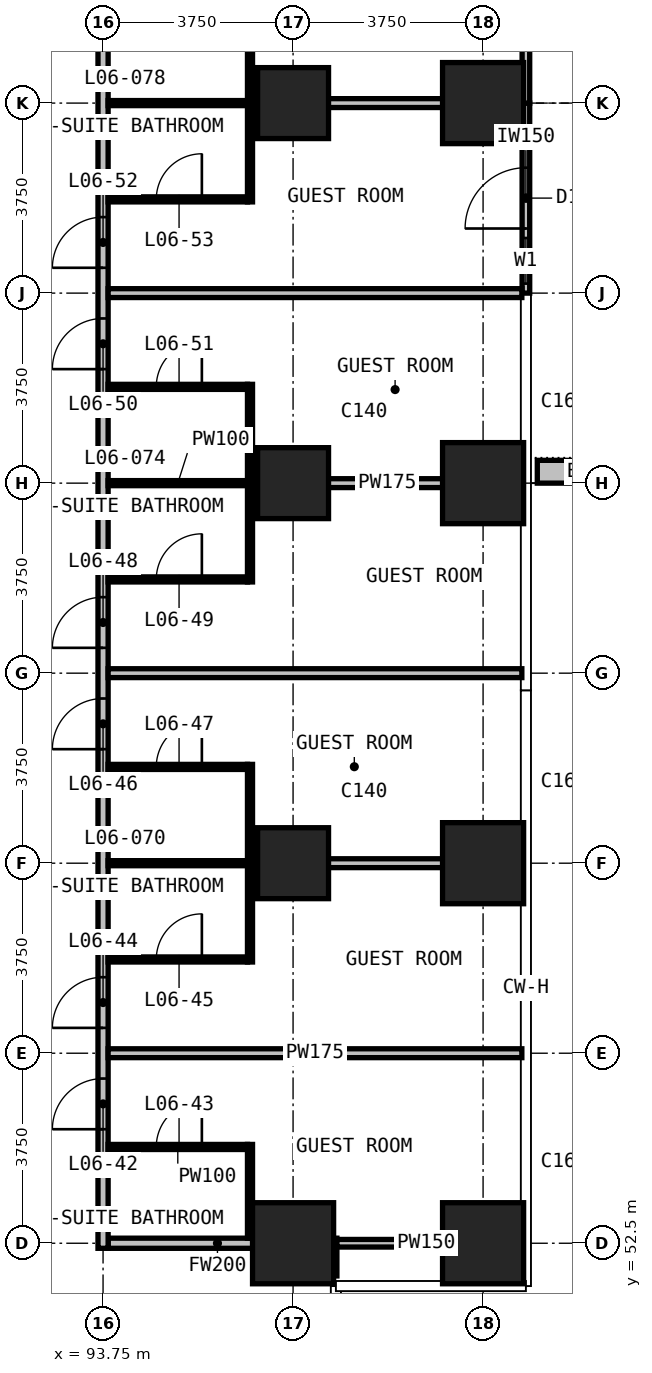
"""IFC4 building model, lengths in metres.
Left out: names, types, materials, properties, quantities, classifications, styles, units other than length and angle.
Written with IfcOpenShell. Run it as: python <this file> out.ifc"""

import sys

from ifc_helpers import new_model, si_unit, direction, frame, frame_2d, origin, origin_2d, place, context, subcontext, project, spatial, rectangle, extrude, element, fill, save


model = new_model("IFC4")
c1 = context("Model", 3, precision=1e-05, world=origin(), true_north=direction((0.0, 1.0)))
c2 = subcontext(c1, "Body", "Model", "MODEL_VIEW")
j1 = project(units=[si_unit("LENGTHUNIT", "METRE"), si_unit("PLANEANGLEUNIT", "RADIAN")], contexts=[c1])
p1 = place(None, origin())
s1 = spatial("IfcSite", under=j1, at=p1, CompositionType="ELEMENT")
p2 = place(p1, origin())
s2 = spatial("IfcBuilding", under=s1, at=p2, CompositionType="ELEMENT")
p3 = place(p2, frame((0.0, 0.0, 39.5)))
s3 = spatial("IfcBuildingStorey", under=s2, at=p3, CompositionType="ELEMENT", Elevation=39.5)
p4 = place(p3, frame((97.5, 52.5, 0.0), z_axis=(0.0, 0.0, 1.0), x_axis=(1.0, 0.0, 0.0)))
e1 = element("IfcColumn", 1, at=p4, inside=s3, PredefinedType="COLUMN", context=c2, shape_type="SweptSolid", body=[
    extrude(rectangle(XDim=1.6, YDim=1.6, at=origin_2d()), origin(), (0.0, 0.0, 1.0), 3.3),
])
for number, where, z_axis, x_axis in (
    (2, (97.5, 60.0, 0.0), (0.0, 0.0, 1.0), (1.0, 0.0, 0.0)),
    (3, (97.5, 67.5, 0.0), (0.0, 0.0, 1.0), (1.0, 0.0, 0.0)),
    (4, (97.5, 75.0, 0.0), (0.0, 0.0, 1.0), (1.0, 0.0, 0.0)),
):
    element("IfcColumn", number, at=place(p3, frame(where, z_axis=z_axis, x_axis=x_axis)), inside=s3, PredefinedType="COLUMN", context=c2, shape_type="SweptSolid", body=[
        extrude(rectangle(XDim=1.4, YDim=1.4, at=origin_2d()), origin(), (0.0, 0.0, 1.0), 3.3),
    ])
for number, where, z_axis, x_axis in (
    (5, (101.25, 52.5, 0.0), (0.0, 0.0, 1.0), (1.0, 0.0, 0.0)),
    (6, (101.25, 60.0, 0.0), (0.0, 0.0, 1.0), (1.0, 0.0, 0.0)),
    (7, (101.25, 67.5, 0.0), (0.0, 0.0, 1.0), (1.0, 0.0, 0.0)),
    (8, (101.25, 75.0, 0.0), (0.0, 0.0, 1.0), (1.0, 0.0, 0.0)),
):
    element("IfcColumn", number, at=place(p3, frame(where, z_axis=z_axis, x_axis=x_axis)), inside=s3, PredefinedType="COLUMN", context=c2, shape_type="SweptSolid", body=[
        extrude(rectangle(XDim=1.6, YDim=1.6, at=origin_2d()), origin(), (0.0, 0.0, 1.0), 3.3),
    ])
p5 = place(p3, frame((102.095, 71.25, 0.0), z_axis=(0.0, 0.0, 1.0), x_axis=(0.0, 1.0, 0.0)))
e9 = element("IfcWall", 9, at=p5, inside=s3, PredefinedType="SOLIDWALL", context=c2, shape_type="SweptSolid", body=[
    extrude(rectangle(XDim=3.75, YDim=0.15, at=frame_2d((1.875, 0.0))), origin(), (0.0, 0.0, 1.0), 3.0),
])
p6 = place(p5, frame((0.188, 0.0, 0.1)))
e10 = element("IfcOpeningElement", 10, at=p6, cuts=e9, PredefinedType="OPENING", context=c2, shape_type="SweptSolid", body=[
    extrude(rectangle(XDim=0.9, YDim=2.4, at=frame_2d((0.45, 1.2))), frame((0.0, 0.085, 0.0), z_axis=(0.0, -1.0, 0.0), x_axis=(1.0, 0.0, 0.0)), (0.0, 0.0, 1.0), 0.17),
])
p7 = place(p5, frame((1.275, 0.0, 0.0)))
e11 = element("IfcOpeningElement", 11, at=p7, cuts=e9, PredefinedType="OPENING", context=c2, shape_type="SweptSolid", body=[
    extrude(rectangle(XDim=1.2, YDim=2.4, at=frame_2d((0.6, 1.2))), frame((0.0, 0.085, 0.0), z_axis=(0.0, -1.0, 0.0), x_axis=(1.0, 0.0, 0.0)), (0.0, 0.0, 1.0), 0.17),
])
p8 = place(p3, frame((102.095, 75.0, 0.0), z_axis=(0.0, 0.0, 1.0), x_axis=(0.0, 1.0, 0.0)))
e12 = element("IfcWall", 12, at=p8, inside=s3, PredefinedType="SOLIDWALL", context=c2, shape_type="SweptSolid", body=[
    extrude(rectangle(XDim=3.75, YDim=0.15, at=frame_2d((1.875, 0.0))), origin(), (0.0, 0.0, 1.0), 3.0),
])
p9 = place(p8, frame((1.275, 0.0, 0.0)))
e13 = element("IfcOpeningElement", 13, at=p9, cuts=e12, PredefinedType="OPENING", context=c2, shape_type="SweptSolid", body=[
    extrude(rectangle(XDim=1.2, YDim=2.4, at=frame_2d((0.6, 1.2))), frame((0.0, 0.085, 0.0), z_axis=(0.0, -1.0, 0.0), x_axis=(1.0, 0.0, 0.0)), (0.0, 0.0, 1.0), 0.17),
])
p10 = place(p8, frame((2.663, 0.0, 0.1)))
e14 = element("IfcOpeningElement", 14, at=p10, cuts=e12, PredefinedType="OPENING", context=c2, shape_type="SweptSolid", body=[
    extrude(rectangle(XDim=0.9, YDim=2.4, at=frame_2d((0.45, 1.2))), frame((0.0, 0.085, 0.0), z_axis=(0.0, -1.0, 0.0), x_axis=(1.0, 0.0, 0.0)), (0.0, 0.0, 1.0), 0.17),
])
p11 = place(p3, frame((102.32, 67.725, 0.0), z_axis=(0.0, 0.0, 1.0), x_axis=(1.0, 0.0, 0.0)))
e15 = element("IfcWall", 15, at=p11, inside=s3, PredefinedType="USERDEFINED", context=c2, shape_type="SweptSolid", body=[
    extrude(rectangle(XDim=2.33, YDim=0.45, at=frame_2d((1.165, 0.0))), origin(), (0.0, 0.0, 1.0), 1.1),
])
p12 = place(p3, frame((93.85, 52.5, 0.0), z_axis=(0.0, 0.0, 1.0), x_axis=(1.0, 0.0, 0.0)))
e16 = element("IfcWall", 16, at=p12, inside=s3, PredefinedType="PARTITIONING", context=c2, shape_type="SweptSolid", body=[
    extrude(rectangle(XDim=4.315, YDim=0.2, at=frame_2d((2.157, 0.0))), origin(), (0.0, 0.0, 1.0), 3.0),
])
p13 = place(p3, frame((93.75, 52.4, 0.0), z_axis=(0.0, 0.0, 1.0), x_axis=(0.0, 1.0, 0.0)))
e17 = element("IfcWall", 17, at=p13, inside=s3, PredefinedType="PARTITIONING", context=c2, shape_type="SweptSolid", body=[
    extrude(rectangle(XDim=33.925, YDim=0.2, at=frame_2d((16.962, 0.0))), origin(), (0.0, 0.0, 1.0), 3.0),
])
p14 = place(p13, frame((2.35, 0.0, 0.0)))
e18 = element("IfcOpeningElement", 18, at=p14, cuts=e17, PredefinedType="OPENING", context=c2, shape_type="SweptSolid", body=[
    extrude(rectangle(XDim=1.0, YDim=2.2, at=frame_2d((0.5, 1.1))), frame((0.0, 0.11, 0.0), z_axis=(0.0, -1.0, 0.0), x_axis=(1.0, 0.0, 0.0)), (0.0, 0.0, 1.0), 0.22),
])
p15 = place(p13, frame((4.35, 0.0, 0.0)))
e19 = element("IfcOpeningElement", 19, at=p15, cuts=e17, PredefinedType="OPENING", context=c2, shape_type="SweptSolid", body=[
    extrude(rectangle(XDim=1.0, YDim=2.2, at=frame_2d((0.5, 1.1))), frame((0.0, 0.11, 0.0), z_axis=(0.0, -1.0, 0.0), x_axis=(1.0, 0.0, 0.0)), (0.0, 0.0, 1.0), 0.22),
])
p16 = place(p13, frame((9.85, 0.0, 0.0)))
e20 = element("IfcOpeningElement", 20, at=p16, cuts=e17, PredefinedType="OPENING", context=c2, shape_type="SweptSolid", body=[
    extrude(rectangle(XDim=1.0, YDim=2.2, at=frame_2d((0.5, 1.1))), frame((0.0, 0.11, 0.0), z_axis=(0.0, -1.0, 0.0), x_axis=(1.0, 0.0, 0.0)), (0.0, 0.0, 1.0), 0.22),
])
p17 = place(p13, frame((11.85, 0.0, 0.0)))
e21 = element("IfcOpeningElement", 21, at=p17, cuts=e17, PredefinedType="OPENING", context=c2, shape_type="SweptSolid", body=[
    extrude(rectangle(XDim=1.0, YDim=2.2, at=frame_2d((0.5, 1.1))), frame((0.0, 0.11, 0.0), z_axis=(0.0, -1.0, 0.0), x_axis=(1.0, 0.0, 0.0)), (0.0, 0.0, 1.0), 0.22),
])
p18 = place(p13, frame((17.35, 0.0, 0.0)))
e22 = element("IfcOpeningElement", 22, at=p18, cuts=e17, PredefinedType="OPENING", context=c2, shape_type="SweptSolid", body=[
    extrude(rectangle(XDim=1.0, YDim=2.2, at=frame_2d((0.5, 1.1))), frame((0.0, 0.11, 0.0), z_axis=(0.0, -1.0, 0.0), x_axis=(1.0, 0.0, 0.0)), (0.0, 0.0, 1.0), 0.22),
])
p19 = place(p13, frame((19.35, 0.0, 0.0)))
e23 = element("IfcOpeningElement", 23, at=p19, cuts=e17, PredefinedType="OPENING", context=c2, shape_type="SweptSolid", body=[
    extrude(rectangle(XDim=1.0, YDim=2.2, at=frame_2d((0.5, 1.1))), frame((0.0, 0.11, 0.0), z_axis=(0.0, -1.0, 0.0), x_axis=(1.0, 0.0, 0.0)), (0.0, 0.0, 1.0), 0.22),
])
p20 = place(p13, frame((24.85, 0.0, 0.0)))
e24 = element("IfcOpeningElement", 24, at=p20, cuts=e17, PredefinedType="OPENING", context=c2, shape_type="SweptSolid", body=[
    extrude(rectangle(XDim=1.0, YDim=2.2, at=frame_2d((0.5, 1.1))), frame((0.0, 0.11, 0.0), z_axis=(0.0, -1.0, 0.0), x_axis=(1.0, 0.0, 0.0)), (0.0, 0.0, 1.0), 0.22),
])
p21 = place(p13, frame((26.85, 0.0, 0.0)))
e25 = element("IfcOpeningElement", 25, at=p21, cuts=e17, PredefinedType="OPENING", context=c2, shape_type="SweptSolid", body=[
    extrude(rectangle(XDim=1.0, YDim=2.2, at=frame_2d((0.5, 1.1))), frame((0.0, 0.11, 0.0), z_axis=(0.0, -1.0, 0.0), x_axis=(1.0, 0.0, 0.0)), (0.0, 0.0, 1.0), 0.22),
])
p22 = place(p13, frame((31.55, 0.0, 0.0)))
e26 = element("IfcOpeningElement", 26, at=p22, cuts=e17, PredefinedType="OPENING", context=c2, shape_type="SweptSolid", body=[
    extrude(rectangle(XDim=0.9, YDim=2.2, at=frame_2d((0.45, 1.1))), frame((0.0, 0.11, 0.0), z_axis=(0.0, -1.0, 0.0), x_axis=(1.0, 0.0, 0.0)), (0.0, 0.0, 1.0), 0.22),
])
p23 = place(p3, frame((98.265, 51.855, 0.0), z_axis=(0.0, 0.0, 1.0), x_axis=(0.0, 1.0, 0.0)))
e27 = element("IfcWall", 27, at=p23, inside=s3, PredefinedType="PARTITIONING", context=c2, shape_type="SweptSolid", body=[
    extrude(rectangle(XDim=0.745, YDim=0.2, at=frame_2d((0.373, 0.0))), origin(), (0.0, 0.0, 1.0), 3.0),
])
p24 = place(p3, frame((93.85, 56.25, 0.0), z_axis=(0.0, 0.0, 1.0), x_axis=(1.0, 0.0, 0.0)))
e28 = element("IfcWall", 28, at=p24, inside=s3, PredefinedType="PARTITIONING", context=c2, shape_type="SweptSolid", body=[
    extrude(rectangle(XDim=8.165, YDim=0.175, at=frame_2d((4.083, 0.0))), origin(), (0.0, 0.0, 1.0), 3.0),
])
p25 = place(p3, frame((96.7, 60.0, 0.0), z_axis=(0.0, 0.0, 1.0), x_axis=(1.0, 0.0, 0.0)))
e29 = element("IfcWall", 29, at=p25, inside=s3, PredefinedType="PARTITIONING", context=c2, shape_type="SweptSolid", body=[
    extrude(rectangle(XDim=5.315, YDim=0.175, at=frame_2d((2.657, 0.0))), origin(), (0.0, 0.0, 1.0), 3.0),
])
p26 = place(p3, frame((93.85, 63.75, 0.0), z_axis=(0.0, 0.0, 1.0), x_axis=(1.0, 0.0, 0.0)))
e30 = element("IfcWall", 30, at=p26, inside=s3, PredefinedType="PARTITIONING", context=c2, shape_type="SweptSolid", body=[
    extrude(rectangle(XDim=8.165, YDim=0.175, at=frame_2d((4.083, 0.0))), origin(), (0.0, 0.0, 1.0), 3.0),
])
p27 = place(p3, frame((96.7, 67.5, 0.0), z_axis=(0.0, 0.0, 1.0), x_axis=(1.0, 0.0, 0.0)))
e31 = element("IfcWall", 31, at=p27, inside=s3, PredefinedType="PARTITIONING", context=c2, shape_type="SweptSolid", body=[
    extrude(rectangle(XDim=5.315, YDim=0.175, at=frame_2d((2.657, 0.0))), origin(), (0.0, 0.0, 1.0), 3.0),
])
p28 = place(p3, frame((93.85, 71.25, 0.0), z_axis=(0.0, 0.0, 1.0), x_axis=(1.0, 0.0, 0.0)))
e32 = element("IfcWall", 32, at=p28, inside=s3, PredefinedType="PARTITIONING", context=c2, shape_type="SweptSolid", body=[
    extrude(rectangle(XDim=8.165, YDim=0.175, at=frame_2d((4.083, 0.0))), origin(), (0.0, 0.0, 1.0), 3.0),
])
p29 = place(p3, frame((96.7, 75.0, 0.0), z_axis=(0.0, 0.0, 1.0), x_axis=(1.0, 0.0, 0.0)))
e33 = element("IfcWall", 33, at=p29, inside=s3, PredefinedType="PARTITIONING", context=c2, shape_type="SweptSolid", body=[
    extrude(rectangle(XDim=5.315, YDim=0.175, at=frame_2d((2.657, 0.0))), origin(), (0.0, 0.0, 1.0), 3.0),
])
p30 = place(p3, frame((98.365, 52.5, 0.0), z_axis=(0.0, 0.0, 1.0), x_axis=(1.0, 0.0, 0.0)))
e34 = element("IfcWall", 34, at=p30, inside=s3, PredefinedType="PARTITIONING", context=c2, shape_type="SweptSolid", body=[
    extrude(rectangle(XDim=3.53, YDim=0.15, at=frame_2d((1.765, 0.0))), origin(), (0.0, 0.0, 1.0), 3.0),
])
p31 = place(p3, frame((93.85, 54.4, 0.0), z_axis=(0.0, 0.0, 1.0), x_axis=(1.0, 0.0, 0.0)))
e35 = element("IfcWall", 35, at=p31, inside=s3, PredefinedType="PARTITIONING", context=c2, shape_type="SweptSolid", body=[
    extrude(rectangle(XDim=2.75, YDim=0.1, at=frame_2d((1.375, 0.0))), origin(), (0.0, 0.0, 1.0), 3.0),
])
p32 = place(p31, frame((0.95, 0.0, 0.0)))
e36 = element("IfcOpeningElement", 36, at=p32, cuts=e35, PredefinedType="OPENING", context=c2, shape_type="SweptSolid", body=[
    extrude(rectangle(XDim=0.9, YDim=2.2, at=frame_2d((0.45, 1.1))), frame((0.0, 0.06, 0.0), z_axis=(0.0, -1.0, 0.0), x_axis=(1.0, 0.0, 0.0)), (0.0, 0.0, 1.0), 0.12),
])
p33 = place(p3, frame((93.85, 58.1, 0.0), z_axis=(0.0, 0.0, 1.0), x_axis=(1.0, 0.0, 0.0)))
e37 = element("IfcWall", 37, at=p33, inside=s3, PredefinedType="PARTITIONING", context=c2, shape_type="SweptSolid", body=[
    extrude(rectangle(XDim=2.75, YDim=0.1, at=frame_2d((1.375, 0.0))), origin(), (0.0, 0.0, 1.0), 3.0),
])
p34 = place(p33, frame((0.95, 0.0, 0.0)))
e38 = element("IfcOpeningElement", 38, at=p34, cuts=e37, PredefinedType="OPENING", context=c2, shape_type="SweptSolid", body=[
    extrude(rectangle(XDim=0.9, YDim=2.2, at=frame_2d((0.45, 1.1))), frame((0.0, 0.06, 0.0), z_axis=(0.0, -1.0, 0.0), x_axis=(1.0, 0.0, 0.0)), (0.0, 0.0, 1.0), 0.12),
])
p35 = place(p3, frame((93.85, 60.0, 0.0), z_axis=(0.0, 0.0, 1.0), x_axis=(1.0, 0.0, 0.0)))
e39 = element("IfcWall", 39, at=p35, inside=s3, PredefinedType="PARTITIONING", context=c2, shape_type="SweptSolid", body=[
    extrude(rectangle(XDim=2.75, YDim=0.1, at=frame_2d((1.375, 0.0))), origin(), (0.0, 0.0, 1.0), 3.0),
])
p36 = place(p3, frame((93.85, 61.9, 0.0), z_axis=(0.0, 0.0, 1.0), x_axis=(1.0, 0.0, 0.0)))
e40 = element("IfcWall", 40, at=p36, inside=s3, PredefinedType="PARTITIONING", context=c2, shape_type="SweptSolid", body=[
    extrude(rectangle(XDim=2.75, YDim=0.1, at=frame_2d((1.375, 0.0))), origin(), (0.0, 0.0, 1.0), 3.0),
])
p37 = place(p36, frame((0.95, 0.0, 0.0)))
e41 = element("IfcOpeningElement", 41, at=p37, cuts=e40, PredefinedType="OPENING", context=c2, shape_type="SweptSolid", body=[
    extrude(rectangle(XDim=0.9, YDim=2.2, at=frame_2d((0.45, 1.1))), frame((0.0, 0.06, 0.0), z_axis=(0.0, -1.0, 0.0), x_axis=(1.0, 0.0, 0.0)), (0.0, 0.0, 1.0), 0.12),
])
p38 = place(p3, frame((93.85, 65.6, 0.0), z_axis=(0.0, 0.0, 1.0), x_axis=(1.0, 0.0, 0.0)))
e42 = element("IfcWall", 42, at=p38, inside=s3, PredefinedType="PARTITIONING", context=c2, shape_type="SweptSolid", body=[
    extrude(rectangle(XDim=2.75, YDim=0.1, at=frame_2d((1.375, 0.0))), origin(), (0.0, 0.0, 1.0), 3.0),
])
p39 = place(p38, frame((0.95, 0.0, 0.0)))
e43 = element("IfcOpeningElement", 43, at=p39, cuts=e42, PredefinedType="OPENING", context=c2, shape_type="SweptSolid", body=[
    extrude(rectangle(XDim=0.9, YDim=2.2, at=frame_2d((0.45, 1.1))), frame((0.0, 0.06, 0.0), z_axis=(0.0, -1.0, 0.0), x_axis=(1.0, 0.0, 0.0)), (0.0, 0.0, 1.0), 0.12),
])
p40 = place(p3, frame((93.85, 67.5, 0.0), z_axis=(0.0, 0.0, 1.0), x_axis=(1.0, 0.0, 0.0)))
e44 = element("IfcWall", 44, at=p40, inside=s3, PredefinedType="PARTITIONING", context=c2, shape_type="SweptSolid", body=[
    extrude(rectangle(XDim=2.75, YDim=0.1, at=frame_2d((1.375, 0.0))), origin(), (0.0, 0.0, 1.0), 3.0),
])
p41 = place(p3, frame((93.85, 69.4, 0.0), z_axis=(0.0, 0.0, 1.0), x_axis=(1.0, 0.0, 0.0)))
e45 = element("IfcWall", 45, at=p41, inside=s3, PredefinedType="PARTITIONING", context=c2, shape_type="SweptSolid", body=[
    extrude(rectangle(XDim=2.75, YDim=0.1, at=frame_2d((1.375, 0.0))), origin(), (0.0, 0.0, 1.0), 3.0),
])
p42 = place(p41, frame((0.95, 0.0, 0.0)))
e46 = element("IfcOpeningElement", 46, at=p42, cuts=e45, PredefinedType="OPENING", context=c2, shape_type="SweptSolid", body=[
    extrude(rectangle(XDim=0.9, YDim=2.2, at=frame_2d((0.45, 1.1))), frame((0.0, 0.06, 0.0), z_axis=(0.0, -1.0, 0.0), x_axis=(1.0, 0.0, 0.0)), (0.0, 0.0, 1.0), 0.12),
])
p43 = place(p3, frame((93.85, 73.1, 0.0), z_axis=(0.0, 0.0, 1.0), x_axis=(1.0, 0.0, 0.0)))
e47 = element("IfcWall", 47, at=p43, inside=s3, PredefinedType="PARTITIONING", context=c2, shape_type="SweptSolid", body=[
    extrude(rectangle(XDim=2.75, YDim=0.1, at=frame_2d((1.375, 0.0))), origin(), (0.0, 0.0, 1.0), 3.0),
])
p44 = place(p43, frame((0.95, 0.0, 0.0)))
e48 = element("IfcOpeningElement", 48, at=p44, cuts=e47, PredefinedType="OPENING", context=c2, shape_type="SweptSolid", body=[
    extrude(rectangle(XDim=0.9, YDim=2.2, at=frame_2d((0.45, 1.1))), frame((0.0, 0.06, 0.0), z_axis=(0.0, -1.0, 0.0), x_axis=(1.0, 0.0, 0.0)), (0.0, 0.0, 1.0), 0.12),
])
p45 = place(p3, frame((93.85, 75.0, 0.0), z_axis=(0.0, 0.0, 1.0), x_axis=(1.0, 0.0, 0.0)))
e49 = element("IfcWall", 49, at=p45, inside=s3, PredefinedType="PARTITIONING", context=c2, shape_type="SweptSolid", body=[
    extrude(rectangle(XDim=2.75, YDim=0.1, at=frame_2d((1.375, 0.0))), origin(), (0.0, 0.0, 1.0), 3.0),
])
p46 = place(p3, frame((96.65, 52.6, 0.0), z_axis=(0.0, 0.0, 1.0), x_axis=(0.0, 1.0, 0.0)))
e50 = element("IfcWall", 50, at=p46, inside=s3, PredefinedType="PARTITIONING", context=c2, shape_type="SweptSolid", body=[
    extrude(rectangle(XDim=1.85, YDim=0.1, at=frame_2d((0.925, 0.0))), origin(), (0.0, 0.0, 1.0), 3.0),
])
for number, where, z_axis, x_axis in (
    (51, (96.65, 58.05, 0.0), (0.0, 0.0, 1.0), (0.0, 1.0, 0.0)),
    (52, (96.65, 65.55, 0.0), (0.0, 0.0, 1.0), (0.0, 1.0, 0.0)),
    (53, (96.65, 73.05, 0.0), (0.0, 0.0, 1.0), (0.0, 1.0, 0.0)),
):
    element("IfcWall", number, at=place(p3, frame(where, z_axis=z_axis, x_axis=x_axis)), inside=s3, PredefinedType="PARTITIONING", context=c2, shape_type="SweptSolid", body=[
        extrude(rectangle(XDim=3.9, YDim=0.1, at=frame_2d((1.95, 0.0))), origin(), (0.0, 0.0, 1.0), 3.0),
    ])
p47 = place(p6, origin())
e54 = element("IfcWindow", 54, at=p47, inside=s3, PartitioningType="SINGLE_PANEL", PredefinedType="WINDOW", context=c2, shape_type="SweptSolid", body=[
    extrude(rectangle(XDim=0.9, YDim=2.4, at=frame_2d((0.45, 1.2))), frame((0.0, 0.03, 0.0), z_axis=(0.0, -1.0, 0.0), x_axis=(1.0, 0.0, 0.0)), (0.0, 0.0, 1.0), 0.06),
])
fill(e10, e54)
p48 = place(p7, origin())
e55 = element("IfcDoor", 55, at=p48, inside=s3, OperationType="SINGLE_SWING_LEFT", PredefinedType="DOOR", context=c2, shape_type="SweptSolid", body=[
    extrude(rectangle(XDim=1.2, YDim=2.4, at=frame_2d((0.6, 1.2))), frame((0.0, 0.025, 0.0), z_axis=(0.0, -1.0, 0.0), x_axis=(1.0, 0.0, 0.0)), (0.0, 0.0, 1.0), 0.05),
])
fill(e11, e55)
p49 = place(p14, origin())
e56 = element("IfcDoor", 56, at=p49, inside=s3, OperationType="SINGLE_SWING_LEFT", PredefinedType="DOOR", context=c2, shape_type="SweptSolid", body=[
    extrude(rectangle(XDim=1.0, YDim=2.2, at=frame_2d((0.5, 1.1))), frame((0.0, 0.025, 0.0), z_axis=(0.0, -1.0, 0.0), x_axis=(1.0, 0.0, 0.0)), (0.0, 0.0, 1.0), 0.05),
])
fill(e18, e56)
p50 = place(p32, origin())
e57 = element("IfcDoor", 57, at=p50, inside=s3, OperationType="SINGLE_SWING_RIGHT", PredefinedType="DOOR", context=c2, shape_type="SweptSolid", body=[
    extrude(rectangle(XDim=0.9, YDim=2.2, at=frame_2d((0.45, 1.1))), frame((0.0, 0.025, 0.0), z_axis=(0.0, -1.0, 0.0), x_axis=(1.0, 0.0, 0.0)), (0.0, 0.0, 1.0), 0.05),
])
fill(e36, e57)
p51 = place(p15, origin())
e58 = element("IfcDoor", 58, at=p51, inside=s3, OperationType="SINGLE_SWING_RIGHT", PredefinedType="DOOR", context=c2, shape_type="SweptSolid", body=[
    extrude(rectangle(XDim=1.0, YDim=2.2, at=frame_2d((0.5, 1.1))), frame((0.0, 0.025, 0.0), z_axis=(0.0, -1.0, 0.0), x_axis=(1.0, 0.0, 0.0)), (0.0, 0.0, 1.0), 0.05),
])
fill(e19, e58)
p52 = place(p34, origin())
e59 = element("IfcDoor", 59, at=p52, inside=s3, OperationType="SINGLE_SWING_RIGHT", PredefinedType="DOOR", context=c2, shape_type="SweptSolid", body=[
    extrude(rectangle(XDim=0.9, YDim=2.2, at=frame_2d((0.45, 1.1))), frame((0.0, 0.025, 0.0), z_axis=(0.0, -1.0, 0.0), x_axis=(1.0, 0.0, 0.0)), (0.0, 0.0, 1.0), 0.05),
])
fill(e38, e59)
p53 = place(p16, origin())
e60 = element("IfcDoor", 60, at=p53, inside=s3, OperationType="SINGLE_SWING_RIGHT", PredefinedType="DOOR", context=c2, shape_type="SweptSolid", body=[
    extrude(rectangle(XDim=1.0, YDim=2.2, at=frame_2d((0.5, 1.1))), frame((0.0, 0.025, 0.0), z_axis=(0.0, -1.0, 0.0), x_axis=(1.0, 0.0, 0.0)), (0.0, 0.0, 1.0), 0.05),
])
fill(e20, e60)
p54 = place(p37, origin())
e61 = element("IfcDoor", 61, at=p54, inside=s3, OperationType="SINGLE_SWING_RIGHT", PredefinedType="DOOR", context=c2, shape_type="SweptSolid", body=[
    extrude(rectangle(XDim=0.9, YDim=2.2, at=frame_2d((0.45, 1.1))), frame((0.0, 0.025, 0.0), z_axis=(0.0, -1.0, 0.0), x_axis=(1.0, 0.0, 0.0)), (0.0, 0.0, 1.0), 0.05),
])
fill(e41, e61)
p55 = place(p17, origin())
e62 = element("IfcDoor", 62, at=p55, inside=s3, OperationType="SINGLE_SWING_LEFT", PredefinedType="DOOR", context=c2, shape_type="SweptSolid", body=[
    extrude(rectangle(XDim=1.0, YDim=2.2, at=frame_2d((0.5, 1.1))), frame((0.0, 0.025, 0.0), z_axis=(0.0, -1.0, 0.0), x_axis=(1.0, 0.0, 0.0)), (0.0, 0.0, 1.0), 0.05),
])
fill(e21, e62)
p56 = place(p39, origin())
e63 = element("IfcDoor", 63, at=p56, inside=s3, OperationType="SINGLE_SWING_RIGHT", PredefinedType="DOOR", context=c2, shape_type="SweptSolid", body=[
    extrude(rectangle(XDim=0.9, YDim=2.2, at=frame_2d((0.45, 1.1))), frame((0.0, 0.025, 0.0), z_axis=(0.0, -1.0, 0.0), x_axis=(1.0, 0.0, 0.0)), (0.0, 0.0, 1.0), 0.05),
])
fill(e43, e63)
p57 = place(p18, origin())
e64 = element("IfcDoor", 64, at=p57, inside=s3, OperationType="SINGLE_SWING_RIGHT", PredefinedType="DOOR", context=c2, shape_type="SweptSolid", body=[
    extrude(rectangle(XDim=1.0, YDim=2.2, at=frame_2d((0.5, 1.1))), frame((0.0, 0.025, 0.0), z_axis=(0.0, -1.0, 0.0), x_axis=(1.0, 0.0, 0.0)), (0.0, 0.0, 1.0), 0.05),
])
fill(e22, e64)
p58 = place(p42, origin())
e65 = element("IfcDoor", 65, at=p58, inside=s3, OperationType="SINGLE_SWING_RIGHT", PredefinedType="DOOR", context=c2, shape_type="SweptSolid", body=[
    extrude(rectangle(XDim=0.9, YDim=2.2, at=frame_2d((0.45, 1.1))), frame((0.0, 0.025, 0.0), z_axis=(0.0, -1.0, 0.0), x_axis=(1.0, 0.0, 0.0)), (0.0, 0.0, 1.0), 0.05),
])
fill(e46, e65)
p59 = place(p19, origin())
e66 = element("IfcDoor", 66, at=p59, inside=s3, OperationType="SINGLE_SWING_RIGHT", PredefinedType="DOOR", context=c2, shape_type="SweptSolid", body=[
    extrude(rectangle(XDim=1.0, YDim=2.2, at=frame_2d((0.5, 1.1))), frame((0.0, 0.025, 0.0), z_axis=(0.0, -1.0, 0.0), x_axis=(1.0, 0.0, 0.0)), (0.0, 0.0, 1.0), 0.05),
])
fill(e23, e66)
p60 = place(p44, origin())
e67 = element("IfcDoor", 67, at=p60, inside=s3, OperationType="SINGLE_SWING_RIGHT", PredefinedType="DOOR", context=c2, shape_type="SweptSolid", body=[
    extrude(rectangle(XDim=0.9, YDim=2.2, at=frame_2d((0.45, 1.1))), frame((0.0, 0.025, 0.0), z_axis=(0.0, -1.0, 0.0), x_axis=(1.0, 0.0, 0.0)), (0.0, 0.0, 1.0), 0.05),
])
fill(e48, e67)
save(model, sys.argv[1])
